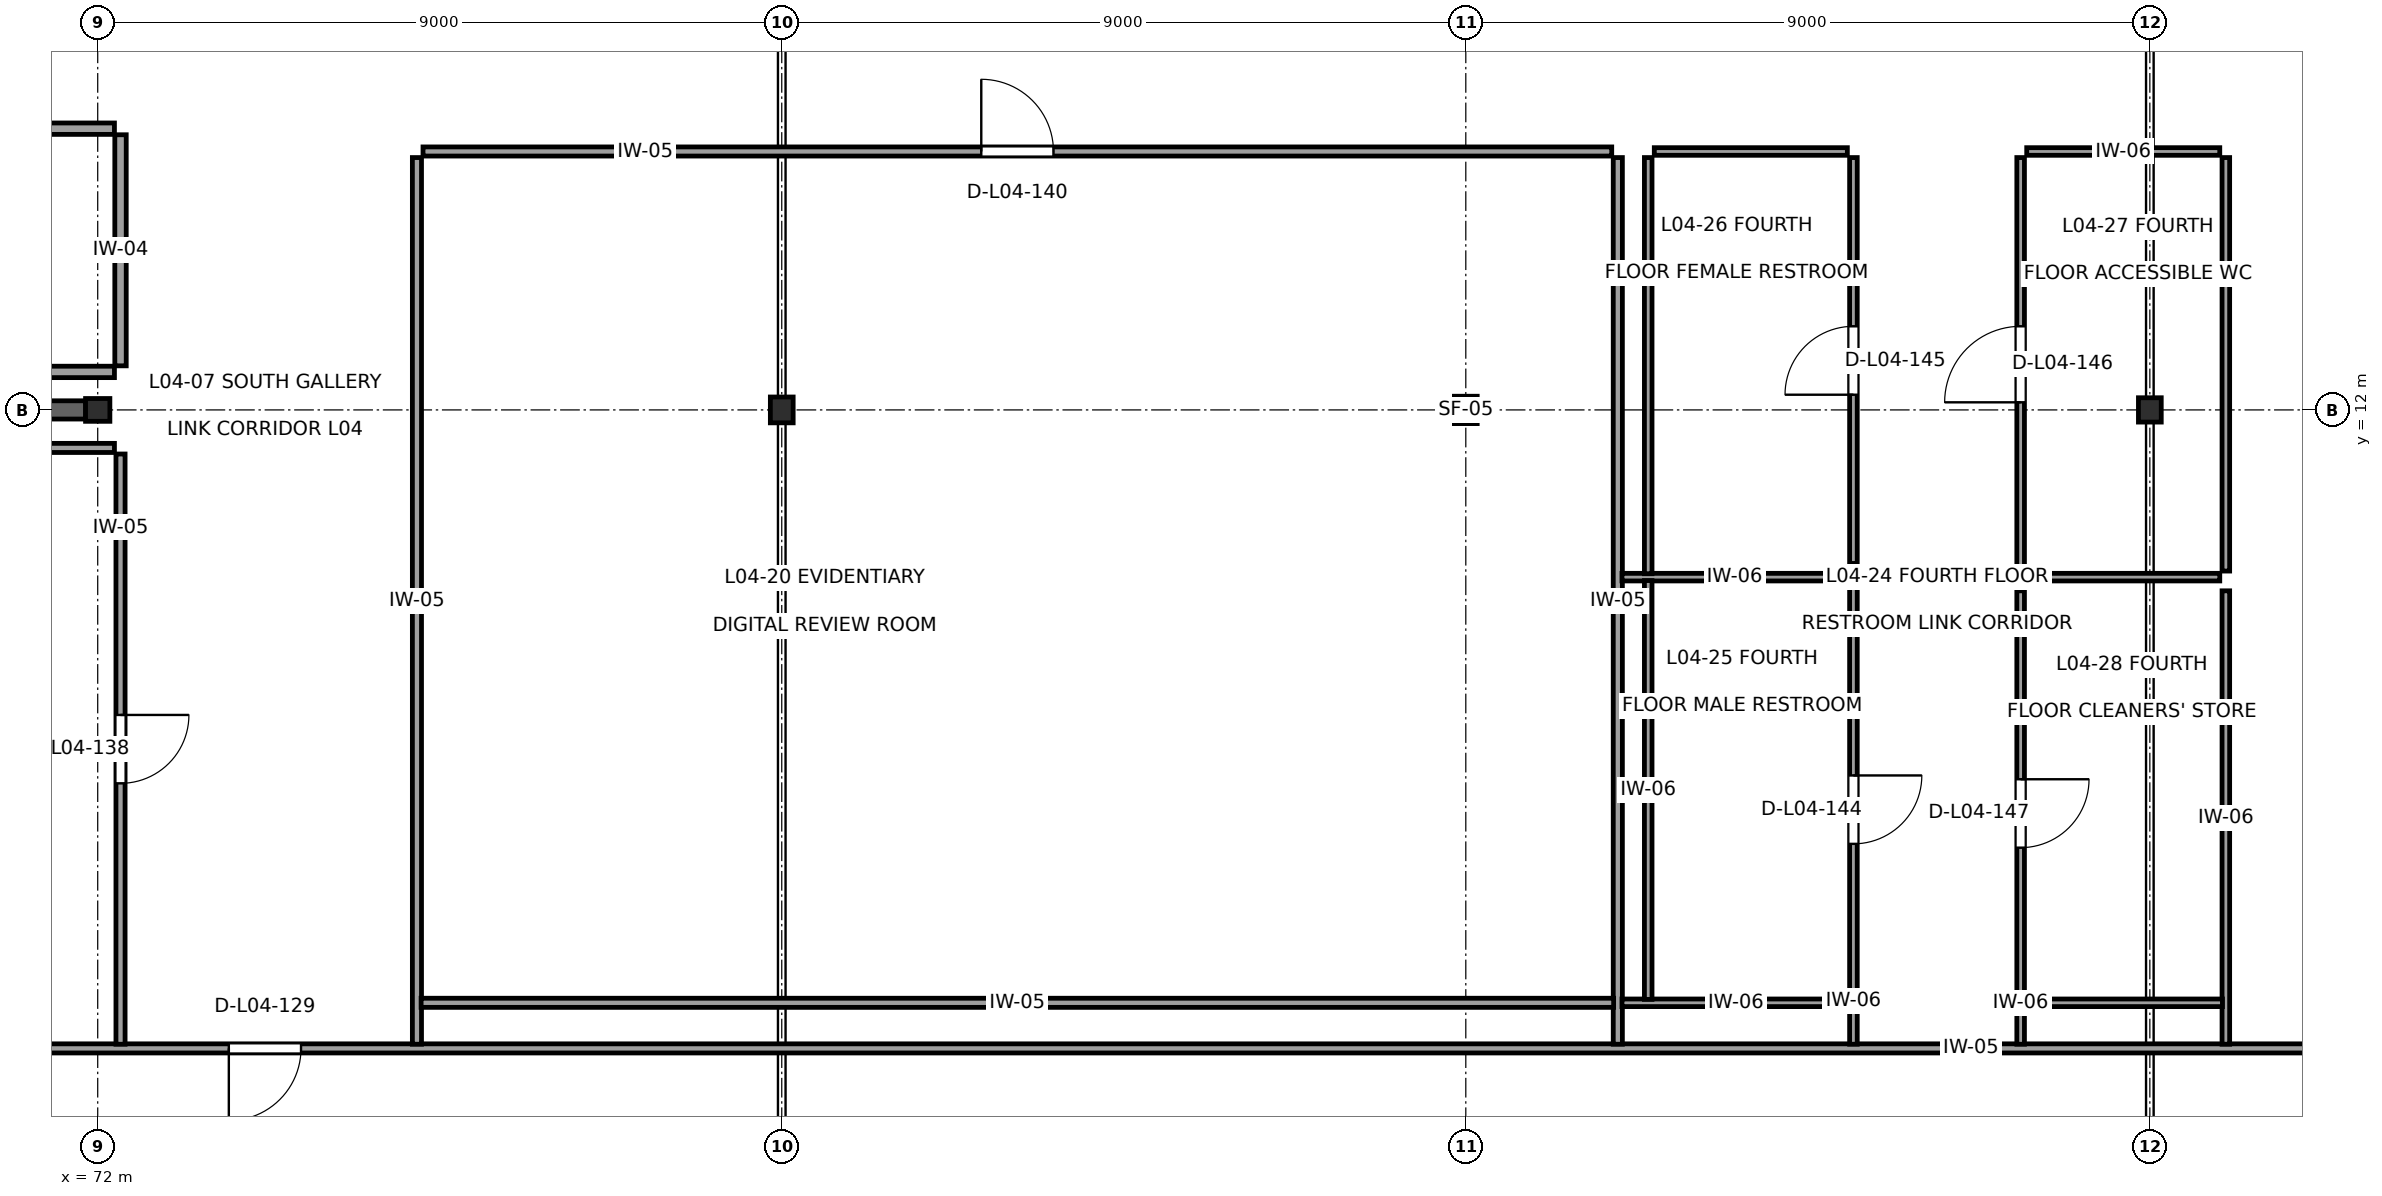
"""IFC4 building model, lengths in metres.
Left out: names, types, materials, properties, quantities, classifications, styles, units other than length and angle.
Written with IfcOpenShell. Run it as: python <this file> out.ifc"""

import sys

from ifc_helpers import new_model, si_unit, direction, frame, frame_2d, origin, origin_2d, place, context, subcontext, project, spatial, rectangle, i_section, extrude, element, fill, save


model = new_model("IFC4")
c1 = context("Model", 3, precision=1e-05, world=origin(), true_north=direction((0.0, 1.0)))
c2 = subcontext(c1, "Body", "Model", "MODEL_VIEW")
j1 = project(units=[si_unit("LENGTHUNIT", "METRE"), si_unit("PLANEANGLEUNIT", "RADIAN")], contexts=[c1])
p1 = place(None, origin())
s1 = spatial("IfcSite", under=j1, at=p1, CompositionType="ELEMENT")
p2 = place(p1, origin())
s2 = spatial("IfcBuilding", under=s1, at=p2, CompositionType="ELEMENT")
p3 = place(p2, frame((0.0, 0.0, 18.9)))
s3 = spatial("IfcBuildingStorey", under=s2, at=p3, CompositionType="ELEMENT", Elevation=18.9)
p4 = place(p3, frame((72.0, 12.0, 0.0), z_axis=(0.0, 0.0, 1.0), x_axis=(0.0, 1.0, 0.0)))
e1 = element("IfcColumn", 1, at=p4, inside=s3, PredefinedType="COLUMN", context=c2, shape_type="SweptSolid", body=[
    extrude(i_section(OverallWidth=0.3, OverallDepth=0.32, WebThickness=0.011, FlangeThickness=0.021, at=origin_2d()), origin(), (0.0, 0.0, 1.0), 4.5),
])
p5 = place(p3, frame((81.0, 12.0, 0.0), z_axis=(0.0, 0.0, 1.0), x_axis=(1.0, 0.0, 0.0)))
e2 = element("IfcColumn", 2, at=p5, inside=s3, PredefinedType="COLUMN", context=c2, shape_type="SweptSolid", body=[
    extrude(i_section(OverallWidth=0.3, OverallDepth=0.34, WebThickness=0.012, FlangeThickness=0.021, at=origin_2d()), origin(), (0.0, 0.0, 1.0), 4.5),
])
p6 = place(p3, frame((90.0, 12.0, 0.0), z_axis=(0.0, 0.0, 1.0), x_axis=(1.0, 0.0, 0.0)))
e3 = element("IfcColumn", 3, at=p6, inside=s3, PredefinedType="COLUMN", context=c2, shape_type="SweptSolid", body=[
    extrude(i_section(OverallWidth=0.3, OverallDepth=0.36, WebThickness=0.012, FlangeThickness=0.022, at=origin_2d()), origin(), (0.0, 0.0, 1.0), 4.5),
])
p7 = place(p3, frame((99.0, 12.0, 0.0), z_axis=(0.0, 0.0, 1.0), x_axis=(1.0, 0.0, 0.0)))
e4 = element("IfcColumn", 4, at=p7, inside=s3, PredefinedType="COLUMN", context=c2, shape_type="SweptSolid", body=[
    extrude(i_section(OverallWidth=0.3, OverallDepth=0.32, WebThickness=0.011, FlangeThickness=0.021, at=origin_2d()), origin(), (0.0, 0.0, 1.0), 4.5),
])
p8 = place(p3, frame((63.008, 12.0, 0.0), z_axis=(0.0, 0.0, 1.0), x_axis=(1.0, 0.0, 0.0)))
e5 = element("IfcWall", 5, at=p8, inside=s3, PredefinedType="SHEAR", context=c2, shape_type="SweptSolid", body=[
    extrude(rectangle(XDim=8.834, YDim=0.24, at=frame_2d((4.417, 0.0))), origin(), (0.0, 0.0, 1.0), 3.355),
])
p9 = place(p3, frame((53.87, 3.6, 0.0), z_axis=(0.0, 0.0, 1.0), x_axis=(1.0, 0.0, 0.0)))
e6 = element("IfcWall", 6, at=p9, inside=s3, PredefinedType="PARTITIONING", context=c2, shape_type="SweptSolid", body=[
    extrude(rectangle(XDim=63.25, YDim=0.12, at=frame_2d((31.625, 0.0))), origin(), (0.0, 0.0, 1.0), 4.14),
])
p10 = place(p9, frame((19.855, 0.0, 0.0)))
e7 = element("IfcOpeningElement", 7, at=p10, cuts=e6, PredefinedType="OPENING", context=c2, shape_type="SweptSolid", body=[
    extrude(rectangle(XDim=0.95, YDim=2.15, at=frame_2d((0.475, 1.075))), frame((0.0, 0.075, 0.0), z_axis=(0.0, -1.0, 0.0), x_axis=(1.0, 0.0, 0.0)), (0.0, 0.0, 1.0), 0.15),
])
p11 = place(p3, frame((72.3, 11.42, 0.0), z_axis=(0.0, 0.0, 1.0), x_axis=(0.0, -1.0, 0.0)))
e8 = element("IfcWall", 8, at=p11, inside=s3, PredefinedType="PARTITIONING", context=c2, shape_type="SweptSolid", body=[
    extrude(rectangle(XDim=7.765, YDim=0.12, at=frame_2d((3.882, 0.0))), origin(), (0.0, 0.0, 1.0), 4.14),
])
p12 = place(p11, frame((3.433, 0.0, 0.0)))
e9 = element("IfcOpeningElement", 9, at=p12, cuts=e8, PredefinedType="OPENING", context=c2, shape_type="SweptSolid", body=[
    extrude(rectangle(XDim=0.9, YDim=2.1, at=frame_2d((0.45, 1.05))), frame((0.0, 0.075, 0.0), z_axis=(0.0, -1.0, 0.0), x_axis=(1.0, 0.0, 0.0)), (0.0, 0.0, 1.0), 0.15),
])
p13 = place(p3, frame((62.795, 11.5, 0.0), z_axis=(0.0, 0.0, 1.0), x_axis=(1.0, 0.0, 0.0)))
e10 = element("IfcWall", 10, at=p13, inside=s3, PredefinedType="PARTITIONING", context=c2, shape_type="SweptSolid", body=[
    extrude(rectangle(XDim=9.425, YDim=0.12, at=frame_2d((4.712, 0.0))), origin(), (0.0, 0.0, 1.0), 4.14),
])
p14 = place(p3, frame((62.795, 15.7, 0.0), z_axis=(0.0, 0.0, 1.0), x_axis=(1.0, 0.0, 0.0)))
e11 = element("IfcWall", 11, at=p14, inside=s3, PredefinedType="PARTITIONING", context=c2, shape_type="SweptSolid", body=[
    extrude(rectangle(XDim=9.425, YDim=0.15, at=frame_2d((4.712, 0.0))), origin(), (0.0, 0.0, 1.0), 4.14),
])
p15 = place(p14, frame((4.187, 0.0, 0.0)))
e12 = element("IfcOpeningElement", 12, at=p15, cuts=e11, PredefinedType="OPENING", context=c2, shape_type="SweptSolid", body=[
    extrude(rectangle(XDim=1.05, YDim=2.25, at=frame_2d((0.525, 1.125))), frame((0.0, 0.09, 0.0), z_axis=(0.0, -1.0, 0.0), x_axis=(1.0, 0.0, 0.0)), (0.0, 0.0, 1.0), 0.18),
])
p16 = place(p3, frame((72.3, 15.62, 0.0), z_axis=(0.0, 0.0, 1.0), x_axis=(0.0, -1.0, 0.0)))
e13 = element("IfcWall", 13, at=p16, inside=s3, PredefinedType="PARTITIONING", context=c2, shape_type="SweptSolid", body=[
    extrude(rectangle(XDim=3.04, YDim=0.15, at=frame_2d((1.52, 0.0))), origin(), (0.0, 0.0, 1.0), 4.14),
])
p17 = place(p3, frame((72.22, 12.5, 0.0), z_axis=(0.0, 0.0, 1.0), x_axis=(-1.0, 0.0, 0.0)))
e14 = element("IfcWall", 14, at=p17, inside=s3, PredefinedType="PARTITIONING", context=c2, shape_type="SweptSolid", body=[
    extrude(rectangle(XDim=9.425, YDim=0.15, at=frame_2d((4.712, 0.0))), origin(), (0.0, 0.0, 1.0), 4.14),
])
p18 = place(p3, frame((76.2, 3.655, 0.0), z_axis=(0.0, 0.0, 1.0), x_axis=(0.0, 1.0, 0.0)))
e15 = element("IfcWall", 15, at=p18, inside=s3, PredefinedType="PARTITIONING", context=c2, shape_type="SweptSolid", body=[
    extrude(rectangle(XDim=11.665, YDim=0.12, at=frame_2d((5.833, 0.0))), origin(), (0.0, 0.0, 1.0), 4.14),
])
p19 = place(p3, frame((76.28, 15.4, 0.0), z_axis=(0.0, 0.0, 1.0), x_axis=(1.0, 0.0, 0.0)))
e16 = element("IfcWall", 16, at=p19, inside=s3, PredefinedType="PARTITIONING", context=c2, shape_type="SweptSolid", body=[
    extrude(rectangle(XDim=15.64, YDim=0.12, at=frame_2d((7.82, 0.0))), origin(), (0.0, 0.0, 1.0), 4.14),
])
p20 = place(p19, frame((7.345, 0.0, 0.0)))
e17 = element("IfcOpeningElement", 17, at=p20, cuts=e16, PredefinedType="OPENING", context=c2, shape_type="SweptSolid", body=[
    extrude(rectangle(XDim=0.95, YDim=2.15, at=frame_2d((0.475, 1.075))), frame((0.0, 0.075, 0.0), z_axis=(0.0, -1.0, 0.0), x_axis=(1.0, 0.0, 0.0)), (0.0, 0.0, 1.0), 0.15),
])
p21 = place(p3, frame((92.0, 15.32, 0.0), z_axis=(0.0, 0.0, 1.0), x_axis=(0.0, -1.0, 0.0)))
e18 = element("IfcWall", 18, at=p21, inside=s3, PredefinedType="PARTITIONING", context=c2, shape_type="SweptSolid", body=[
    extrude(rectangle(XDim=11.665, YDim=0.12, at=frame_2d((5.833, 0.0))), origin(), (0.0, 0.0, 1.0), 4.14),
])
p22 = place(p3, frame((91.945, 4.2, 0.0), z_axis=(0.0, 0.0, 1.0), x_axis=(-1.0, 0.0, 0.0)))
e19 = element("IfcWall", 19, at=p22, inside=s3, PredefinedType="PARTITIONING", context=c2, shape_type="SweptSolid", body=[
    extrude(rectangle(XDim=15.69, YDim=0.12, at=frame_2d((7.845, 0.0))), origin(), (0.0, 0.0, 1.0), 4.14),
])
p23 = place(p3, frame((92.055, 9.8, 0.0), z_axis=(0.0, 0.0, 1.0), x_axis=(1.0, 0.0, 0.0)))
e20 = element("IfcWall", 20, at=p23, inside=s3, PredefinedType="PARTITIONING", context=c2, shape_type="SweptSolid", body=[
    extrude(rectangle(XDim=2.965, YDim=0.1, at=frame_2d((1.482, 0.0))), origin(), (0.0, 0.0, 1.0), 4.14),
])
p24 = place(p3, frame((95.1, 9.72, 0.0), z_axis=(0.0, 0.0, 1.0), x_axis=(0.0, -1.0, 0.0)))
e21 = element("IfcWall", 21, at=p24, inside=s3, PredefinedType="PARTITIONING", context=c2, shape_type="SweptSolid", body=[
    extrude(rectangle(XDim=6.065, YDim=0.1, at=frame_2d((3.032, 0.0))), origin(), (0.0, 0.0, 1.0), 4.14),
])
p25 = place(p24, frame((2.529, 0.0, 0.0)))
e22 = element("IfcOpeningElement", 22, at=p25, cuts=e21, PredefinedType="OPENING", context=c2, shape_type="SweptSolid", body=[
    extrude(rectangle(XDim=0.9, YDim=2.05, at=frame_2d((0.45, 1.025))), frame((0.0, 0.065, 0.0), z_axis=(0.0, -1.0, 0.0), x_axis=(1.0, 0.0, 0.0)), (0.0, 0.0, 1.0), 0.13),
])
p26 = place(p3, frame((95.055, 4.2, 0.0), z_axis=(0.0, 0.0, 1.0), x_axis=(-1.0, 0.0, 0.0)))
e23 = element("IfcWall", 23, at=p26, inside=s3, PredefinedType="PARTITIONING", context=c2, shape_type="SweptSolid", body=[
    extrude(rectangle(XDim=3.0, YDim=0.1, at=frame_2d((1.5, 0.0))), origin(), (0.0, 0.0, 1.0), 4.14),
])
p27 = place(p3, frame((92.4, 4.245, 0.0), z_axis=(0.0, 0.0, 1.0), x_axis=(0.0, 1.0, 0.0)))
e24 = element("IfcWall", 24, at=p27, inside=s3, PredefinedType="PARTITIONING", context=c2, shape_type="SweptSolid", body=[
    extrude(rectangle(XDim=5.51, YDim=0.1, at=frame_2d((2.755, 0.0))), origin(), (0.0, 0.0, 1.0), 4.14),
])
p28 = place(p3, frame((95.1, 15.32, 0.0), z_axis=(0.0, 0.0, 1.0), x_axis=(0.0, -1.0, 0.0)))
e25 = element("IfcWall", 25, at=p28, inside=s3, PredefinedType="PARTITIONING", context=c2, shape_type="SweptSolid", body=[
    extrude(rectangle(XDim=5.34, YDim=0.1, at=frame_2d((2.67, 0.0))), origin(), (0.0, 0.0, 1.0), 4.14),
])
p29 = place(p28, frame((2.22, 0.0, 0.0)))
e26 = element("IfcOpeningElement", 26, at=p29, cuts=e25, PredefinedType="OPENING", context=c2, shape_type="SweptSolid", body=[
    extrude(rectangle(XDim=0.9, YDim=2.05, at=frame_2d((0.45, 1.025))), frame((0.0, 0.065, 0.0), z_axis=(0.0, -1.0, 0.0), x_axis=(1.0, 0.0, 0.0)), (0.0, 0.0, 1.0), 0.13),
])
p30 = place(p3, frame((92.4, 9.845, 0.0), z_axis=(0.0, 0.0, 1.0), x_axis=(0.0, 1.0, 0.0)))
e27 = element("IfcWall", 27, at=p30, inside=s3, PredefinedType="PARTITIONING", context=c2, shape_type="SweptSolid", body=[
    extrude(rectangle(XDim=5.475, YDim=0.1, at=frame_2d((2.738, 0.0))), origin(), (0.0, 0.0, 1.0), 4.14),
])
for number, where, z_axis, x_axis in (
    (28, (92.48, 15.4, 0.0), (0.0, 0.0, 1.0), (1.0, 0.0, 0.0)),
    (29, (99.92, 9.8, 0.0), (0.0, 0.0, 1.0), (-1.0, 0.0, 0.0)),
):
    element("IfcWall", number, at=place(p3, frame(where, z_axis=z_axis, x_axis=x_axis)), inside=s3, PredefinedType="PARTITIONING", context=c2, shape_type="SweptSolid", body=[
        extrude(rectangle(XDim=2.54, YDim=0.1, at=frame_2d((1.27, 0.0))), origin(), (0.0, 0.0, 1.0), 4.14),
    ])
p31 = place(p3, frame((97.3, 9.88, 0.0), z_axis=(0.0, 0.0, 1.0), x_axis=(0.0, 1.0, 0.0)))
e30 = element("IfcWall", 30, at=p31, inside=s3, PredefinedType="PARTITIONING", context=c2, shape_type="SweptSolid", body=[
    extrude(rectangle(XDim=5.44, YDim=0.1, at=frame_2d((2.72, 0.0))), origin(), (0.0, 0.0, 1.0), 4.14),
])
p32 = place(p31, frame((2.22, 0.0, 0.0)))
e31 = element("IfcOpeningElement", 31, at=p32, cuts=e30, PredefinedType="OPENING", context=c2, shape_type="SweptSolid", body=[
    extrude(rectangle(XDim=1.0, YDim=2.1, at=frame_2d((0.5, 1.05))), frame((0.0, 0.065, 0.0), z_axis=(0.0, -1.0, 0.0), x_axis=(1.0, 0.0, 0.0)), (0.0, 0.0, 1.0), 0.13),
])
p33 = place(p3, frame((97.38, 15.4, 0.0), z_axis=(0.0, 0.0, 1.0), x_axis=(1.0, 0.0, 0.0)))
e32 = element("IfcWall", 32, at=p33, inside=s3, PredefinedType="PARTITIONING", context=c2, shape_type="SweptSolid", body=[
    extrude(rectangle(XDim=2.54, YDim=0.1, at=frame_2d((1.27, 0.0))), origin(), (0.0, 0.0, 1.0), 4.14),
])
p34 = place(p3, frame((100.0, 15.32, 0.0), z_axis=(0.0, 0.0, 1.0), x_axis=(0.0, -1.0, 0.0)))
e33 = element("IfcWall", 33, at=p34, inside=s3, PredefinedType="PARTITIONING", context=c2, shape_type="SweptSolid", body=[
    extrude(rectangle(XDim=5.44, YDim=0.1, at=frame_2d((2.72, 0.0))), origin(), (0.0, 0.0, 1.0), 4.14),
])
p35 = place(p3, frame((97.3, 3.655, 0.0), z_axis=(0.0, 0.0, 1.0), x_axis=(0.0, 1.0, 0.0)))
e34 = element("IfcWall", 34, at=p35, inside=s3, PredefinedType="PARTITIONING", context=c2, shape_type="SweptSolid", body=[
    extrude(rectangle(XDim=5.965, YDim=0.1, at=frame_2d((2.982, 0.0))), origin(), (0.0, 0.0, 1.0), 4.14),
])
p36 = place(p35, frame((2.586, 0.0, 0.0)))
e35 = element("IfcOpeningElement", 35, at=p36, cuts=e34, PredefinedType="OPENING", context=c2, shape_type="SweptSolid", body=[
    extrude(rectangle(XDim=0.9, YDim=2.05, at=frame_2d((0.45, 1.025))), frame((0.0, 0.065, 0.0), z_axis=(0.0, -1.0, 0.0), x_axis=(1.0, 0.0, 0.0)), (0.0, 0.0, 1.0), 0.13),
])
p37 = place(p3, frame((100.0, 9.62, 0.0), z_axis=(0.0, 0.0, 1.0), x_axis=(0.0, -1.0, 0.0)))
e36 = element("IfcWall", 36, at=p37, inside=s3, PredefinedType="PARTITIONING", context=c2, shape_type="SweptSolid", body=[
    extrude(rectangle(XDim=5.965, YDim=0.1, at=frame_2d((2.982, 0.0))), origin(), (0.0, 0.0, 1.0), 4.14),
])
p38 = place(p3, frame((99.955, 4.2, 0.0), z_axis=(0.0, 0.0, 1.0), x_axis=(-1.0, 0.0, 0.0)))
e37 = element("IfcWall", 37, at=p38, inside=s3, PredefinedType="PARTITIONING", context=c2, shape_type="SweptSolid", body=[
    extrude(rectangle(XDim=2.61, YDim=0.1, at=frame_2d((1.305, 0.0))), origin(), (0.0, 0.0, 1.0), 4.14),
])
p39 = place(p10, frame((0.95, 0.0, 0.0), z_axis=(0.0, 0.0, 1.0), x_axis=(-1.0, 0.0, 0.0)))
e38 = element("IfcDoor", 38, at=p39, inside=s3, OperationType="SINGLE_SWING_LEFT", PredefinedType="DOOR", context=c2, shape_type="SweptSolid", body=[
    extrude(rectangle(XDim=0.95, YDim=2.15, at=frame_2d((0.475, 1.075))), frame((0.0, 0.025, 0.0), z_axis=(0.0, -1.0, 0.0), x_axis=(1.0, 0.0, 0.0)), (0.0, 0.0, 1.0), 0.05),
])
fill(e7, e38)
p40 = place(p12, origin())
e39 = element("IfcDoor", 39, at=p40, inside=s3, OperationType="SINGLE_SWING_LEFT", PredefinedType="DOOR", context=c2, shape_type="SweptSolid", body=[
    extrude(rectangle(XDim=0.9, YDim=2.1, at=frame_2d((0.45, 1.05))), frame((0.0, 0.025, 0.0), z_axis=(0.0, -1.0, 0.0), x_axis=(1.0, 0.0, 0.0)), (0.0, 0.0, 1.0), 0.05),
])
fill(e9, e39)
p41 = place(p20, origin())
e40 = element("IfcDoor", 40, at=p41, inside=s3, OperationType="SINGLE_SWING_LEFT", PredefinedType="DOOR", context=c2, shape_type="SweptSolid", body=[
    extrude(rectangle(XDim=0.95, YDim=2.15, at=frame_2d((0.475, 1.075))), frame((0.0, 0.025, 0.0), z_axis=(0.0, -1.0, 0.0), x_axis=(1.0, 0.0, 0.0)), (0.0, 0.0, 1.0), 0.05),
])
fill(e17, e40)
p42 = place(p25, origin())
e41 = element("IfcDoor", 41, at=p42, inside=s3, OperationType="SINGLE_SWING_LEFT", PredefinedType="DOOR", context=c2, shape_type="SweptSolid", body=[
    extrude(rectangle(XDim=0.9, YDim=2.05, at=frame_2d((0.45, 1.025))), frame((0.0, 0.025, 0.0), z_axis=(0.0, -1.0, 0.0), x_axis=(1.0, 0.0, 0.0)), (0.0, 0.0, 1.0), 0.05),
])
fill(e22, e41)
p43 = place(p29, frame((0.9, 0.0, 0.0), z_axis=(0.0, 0.0, 1.0), x_axis=(-1.0, 0.0, 0.0)))
e42 = element("IfcDoor", 42, at=p43, inside=s3, OperationType="SINGLE_SWING_RIGHT", PredefinedType="DOOR", context=c2, shape_type="SweptSolid", body=[
    extrude(rectangle(XDim=0.9, YDim=2.05, at=frame_2d((0.45, 1.025))), frame((0.0, 0.025, 0.0), z_axis=(0.0, -1.0, 0.0), x_axis=(1.0, 0.0, 0.0)), (0.0, 0.0, 1.0), 0.05),
])
fill(e26, e42)
p44 = place(p32, origin())
e43 = element("IfcDoor", 43, at=p44, inside=s3, OperationType="SINGLE_SWING_LEFT", PredefinedType="DOOR", context=c2, shape_type="SweptSolid", body=[
    extrude(rectangle(XDim=1.0, YDim=2.1, at=frame_2d((0.5, 1.05))), frame((0.0, 0.025, 0.0), z_axis=(0.0, -1.0, 0.0), x_axis=(1.0, 0.0, 0.0)), (0.0, 0.0, 1.0), 0.05),
])
fill(e31, e43)
p45 = place(p36, frame((0.9, 0.0, 0.0), z_axis=(0.0, 0.0, 1.0), x_axis=(-1.0, 0.0, 0.0)))
e44 = element("IfcDoor", 44, at=p45, inside=s3, OperationType="SINGLE_SWING_RIGHT", PredefinedType="DOOR", context=c2, shape_type="SweptSolid", body=[
    extrude(rectangle(XDim=0.9, YDim=2.05, at=frame_2d((0.45, 1.025))), frame((0.0, 0.025, 0.0), z_axis=(0.0, -1.0, 0.0), x_axis=(1.0, 0.0, 0.0)), (0.0, 0.0, 1.0), 0.05),
])
fill(e35, e44)
save(model, sys.argv[1])
